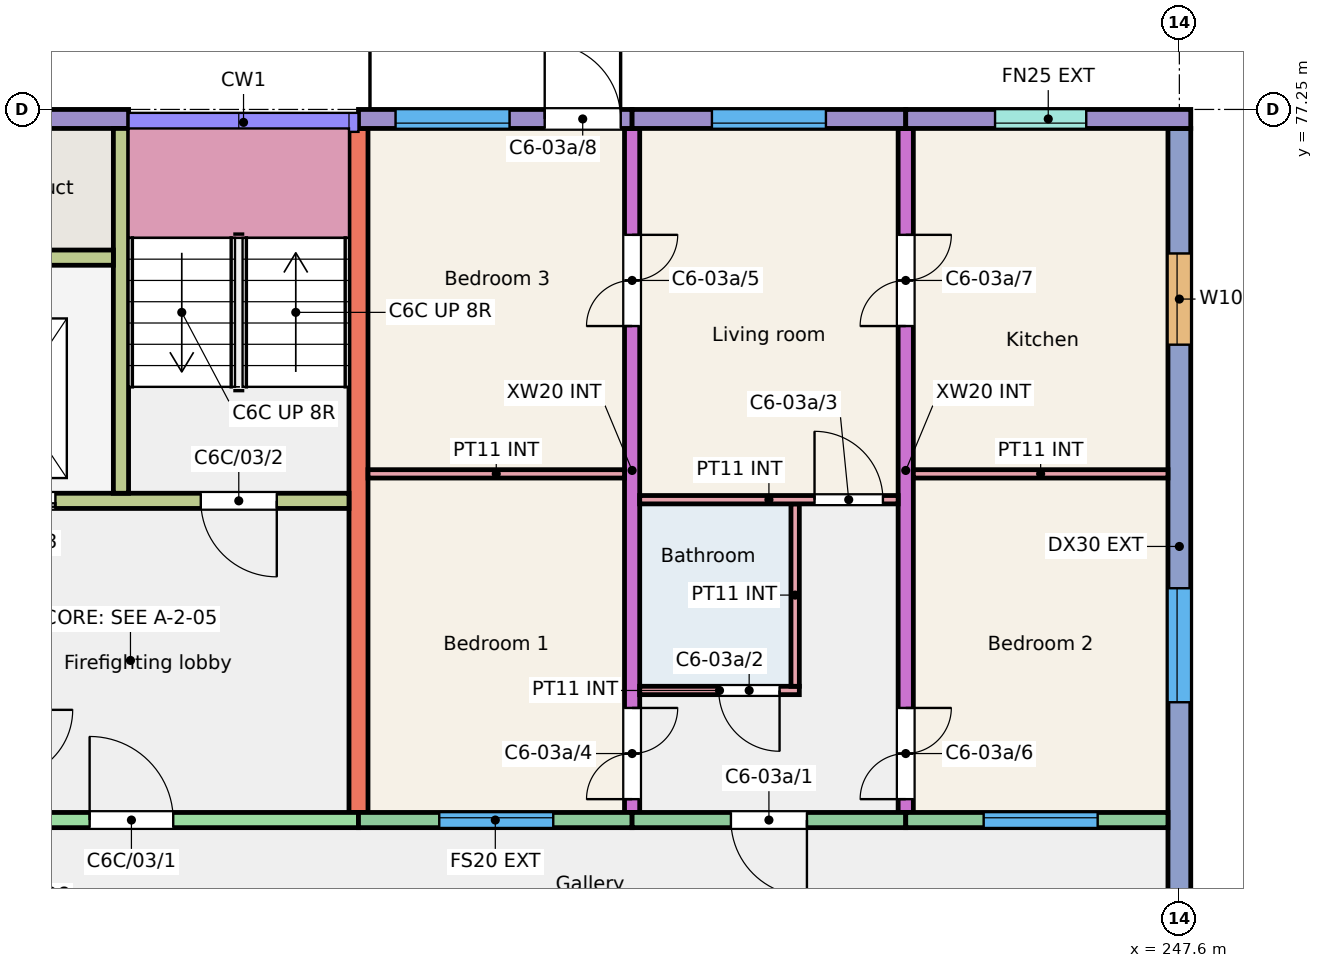
"""IFC4 building model, lengths in metres.
Left out: names, types, materials, properties, quantities, classifications, styles, units other than length and angle.
Written with IfcOpenShell. Run it as: python <this file> out.ifc"""

import sys

from ifc_helpers import new_model, si_unit, direction, frame, frame_2d, origin, place, context, subcontext, project, spatial, rectangle, extrude, element, fill, save


model = new_model("IFC4")
c1 = context("Model", 3, precision=1e-05, world=origin(), true_north=direction((0.0, 1.0)))
c2 = subcontext(c1, "Body", "Model", "MODEL_VIEW")
j1 = project(units=[si_unit("LENGTHUNIT", "METRE"), si_unit("PLANEANGLEUNIT", "RADIAN")], contexts=[c1])
p1 = place(None, origin())
s1 = spatial("IfcSite", under=j1, at=p1, CompositionType="ELEMENT")
p2 = place(p1, origin())
s2 = spatial("IfcBuilding", under=s1, at=p2, CompositionType="ELEMENT")
p3 = place(p2, frame((0.0, 0.0, 9.0)))
s3 = spatial("IfcBuildingStorey", under=s2, at=p3, CompositionType="ELEMENT", Elevation=9.0)
p4 = place(p3, frame((236.8, 68.0, 0.0), z_axis=(0.0, 0.0, 1.0), x_axis=(0.0, 1.0, 0.0)))
e1 = element("IfcWall", 1, at=p4, inside=s3, PredefinedType="SHEAR", context=c2, shape_type="SweptSolid", body=[
    extrude(rectangle(XDim=9.0, YDim=0.25, at=frame_2d((4.5, 0.0))), origin(), (0.0, 0.0, 1.0), 3.0),
])
p5 = place(p3, frame((240.4, 68.0, 0.0), z_axis=(0.0, 0.0, 1.0), x_axis=(0.0, 1.0, 0.0)))
e2 = element("IfcWall", 2, at=p5, inside=s3, PredefinedType="SHEAR", context=c2, shape_type="SweptSolid", body=[
    extrude(rectangle(XDim=9.0, YDim=0.2, at=frame_2d((4.5, 0.0))), origin(), (0.0, 0.0, 1.0), 3.0),
])
p6 = place(p5, frame((0.175, 0.0, 0.0)))
e3 = element("IfcOpeningElement", 3, at=p6, cuts=e2, PredefinedType="OPENING", context=c2, shape_type="SweptSolid", body=[
    extrude(rectangle(XDim=1.2, YDim=2.1, at=frame_2d((0.6, 1.05))), frame((0.0, 0.11, 0.0), z_axis=(0.0, -1.0, 0.0), x_axis=(1.0, 0.0, 0.0)), (0.0, 0.0, 1.0), 0.22),
])
p7 = place(p5, frame((6.4, 0.0, 0.0)))
e4 = element("IfcOpeningElement", 4, at=p7, cuts=e2, PredefinedType="OPENING", context=c2, shape_type="SweptSolid", body=[
    extrude(rectangle(XDim=1.2, YDim=2.1, at=frame_2d((0.6, 1.05))), frame((0.0, 0.11, 0.0), z_axis=(0.0, -1.0, 0.0), x_axis=(1.0, 0.0, 0.0)), (0.0, 0.0, 1.0), 0.22),
])
p8 = place(p3, frame((244.0, 68.0, 0.0), z_axis=(0.0, 0.0, 1.0), x_axis=(0.0, 1.0, 0.0)))
e5 = element("IfcWall", 5, at=p8, inside=s3, PredefinedType="SHEAR", context=c2, shape_type="SweptSolid", body=[
    extrude(rectangle(XDim=9.0, YDim=0.2, at=frame_2d((4.5, 0.0))), origin(), (0.0, 0.0, 1.0), 3.0),
])
p9 = place(p8, frame((0.175, 0.0, 0.0)))
e6 = element("IfcOpeningElement", 6, at=p9, cuts=e5, PredefinedType="OPENING", context=c2, shape_type="SweptSolid", body=[
    extrude(rectangle(XDim=1.2, YDim=2.1, at=frame_2d((0.6, 1.05))), frame((0.0, 0.11, 0.0), z_axis=(0.0, -1.0, 0.0), x_axis=(1.0, 0.0, 0.0)), (0.0, 0.0, 1.0), 0.22),
])
p10 = place(p8, frame((6.4, 0.0, 0.0)))
e7 = element("IfcOpeningElement", 7, at=p10, cuts=e5, PredefinedType="OPENING", context=c2, shape_type="SweptSolid", body=[
    extrude(rectangle(XDim=1.2, YDim=2.1, at=frame_2d((0.6, 1.05))), frame((0.0, 0.11, 0.0), z_axis=(0.0, -1.0, 0.0), x_axis=(1.0, 0.0, 0.0)), (0.0, 0.0, 1.0), 0.22),
])
p11 = place(p3, frame((247.6, 66.0, 0.0), z_axis=(0.0, 0.0, 1.0), x_axis=(0.0, 1.0, 0.0)))
e8 = element("IfcWall", 8, at=p11, inside=s3, PredefinedType="SHEAR", context=c2, shape_type="SweptSolid", body=[
    extrude(rectangle(XDim=11.0, YDim=0.3, at=frame_2d((5.5, 0.0))), origin(), (0.0, 0.0, 1.0), 3.0),
])
p12 = place(p11, frame((3.45, 0.0, 0.9)))
e9 = element("IfcOpeningElement", 9, at=p12, cuts=e8, PredefinedType="OPENING", context=c2, shape_type="SweptSolid", body=[
    extrude(rectangle(XDim=1.5, YDim=1.5, at=frame_2d((0.75, 0.75))), frame((0.0, 0.16, 0.0), z_axis=(0.0, -1.0, 0.0), x_axis=(1.0, 0.0, 0.0)), (0.0, 0.0, 1.0), 0.32),
])
p13 = place(p11, frame((8.155, 0.0, 0.9)))
e10 = element("IfcOpeningElement", 10, at=p13, cuts=e8, PredefinedType="OPENING", context=c2, shape_type="SweptSolid", body=[
    extrude(rectangle(XDim=1.2, YDim=1.5, at=frame_2d((0.6, 0.75))), frame((0.0, 0.16, 0.0), z_axis=(0.0, -1.0, 0.0), x_axis=(1.0, 0.0, 0.0)), (0.0, 0.0, 1.0), 0.32),
])
p14 = place(p3, frame((230.8, 77.125, 0.0), z_axis=(0.0, 0.0, 1.0), x_axis=(1.0, 0.0, 0.0)))
e11 = element("IfcWall", 11, at=p14, inside=s3, PredefinedType="SOLIDWALL", context=c2, shape_type="SweptSolid", body=[
    extrude(rectangle(XDim=2.975, YDim=0.25, at=frame_2d((1.487, 0.0))), origin(), (0.0, 0.0, 1.0), 3.0),
])
p15 = place(p3, frame((230.95, 67.9, 0.0), z_axis=(0.0, 0.0, 1.0), x_axis=(1.0, 0.0, 0.0)))
e12 = element("IfcWall", 12, at=p15, inside=s3, PredefinedType="SHEAR", context=c2, shape_type="SweptSolid", body=[
    extrude(rectangle(XDim=5.85, YDim=0.2, at=frame_2d((2.925, 0.0))), origin(), (0.0, 0.0, 1.0), 3.0),
])
p16 = place(p15, frame((2.312, 0.0, 0.0)))
e13 = element("IfcOpeningElement", 13, at=p16, cuts=e12, PredefinedType="OPENING", context=c2, shape_type="SweptSolid", body=[
    extrude(rectangle(XDim=1.1, YDim=2.1, at=frame_2d((0.55, 1.05))), frame((0.0, 0.11, 0.0), z_axis=(0.0, -1.0, 0.0), x_axis=(1.0, 0.0, 0.0)), (0.0, 0.0, 1.0), 0.22),
])
p17 = place(p3, frame((230.95, 72.1, 0.0), z_axis=(0.0, 0.0, 1.0), x_axis=(1.0, 0.0, 0.0)))
e14 = element("IfcWall", 14, at=p17, inside=s3, PredefinedType="SHEAR", context=c2, shape_type="SweptSolid", body=[
    extrude(rectangle(XDim=5.725, YDim=0.2, at=frame_2d((2.863, 0.0))), origin(), (0.0, 0.0, 1.0), 3.0),
])
p18 = place(p17, frame((3.775, 0.0, 0.0)))
e15 = element("IfcOpeningElement", 15, at=p18, cuts=e14, PredefinedType="OPENING", context=c2, shape_type="SweptSolid", body=[
    extrude(rectangle(XDim=1.0, YDim=2.1, at=frame_2d((0.5, 1.05))), frame((0.0, 0.11, 0.0), z_axis=(0.0, -1.0, 0.0), x_axis=(1.0, 0.0, 0.0)), (0.0, 0.0, 1.0), 0.22),
])
p19 = place(p17, frame((0.762, 0.0, 0.0)))
e16 = element("IfcOpeningElement", 16, at=p19, cuts=e14, PredefinedType="OPENING", context=c2, shape_type="SweptSolid", body=[
    extrude(rectangle(XDim=1.1, YDim=2.1, at=frame_2d((0.55, 1.05))), frame((0.0, 0.11, 0.0), z_axis=(0.0, -1.0, 0.0), x_axis=(1.0, 0.0, 0.0)), (0.0, 0.0, 1.0), 0.22),
])
p20 = place(p3, frame((233.675, 72.2, 0.0), z_axis=(0.0, 0.0, 1.0), x_axis=(0.0, 1.0, 0.0)))
e17 = element("IfcWall", 17, at=p20, inside=s3, PredefinedType="SHEAR", context=c2, shape_type="SweptSolid", body=[
    extrude(rectangle(XDim=4.8, YDim=0.2, at=frame_2d((2.4, 0.0))), origin(), (0.0, 0.0, 1.0), 3.0),
])
p21 = place(p3, frame((230.95, 75.3, 0.0), z_axis=(0.0, 0.0, 1.0), x_axis=(1.0, 0.0, 0.0)))
e18 = element("IfcWall", 18, at=p21, inside=s3, PredefinedType="SHEAR", context=c2, shape_type="SweptSolid", body=[
    extrude(rectangle(XDim=2.625, YDim=0.2, at=frame_2d((1.312, 0.0))), origin(), (0.0, 0.0, 1.0), 3.0),
])
p22 = place(p3, frame((236.8, 77.125, 0.0), z_axis=(0.0, 0.0, 1.0), x_axis=(1.0, 0.0, 0.0)))
e19 = element("IfcWall", 19, at=p22, inside=s3, PredefinedType="SOLIDWALL", context=c2, shape_type="SweptSolid", body=[
    extrude(rectangle(XDim=3.6, YDim=0.25, at=frame_2d((1.8, 0.0))), origin(), (0.0, 0.0, 1.0), 3.0),
])
p23 = place(p22, frame((0.488, 0.0, 0.9)))
e20 = element("IfcOpeningElement", 20, at=p23, cuts=e19, PredefinedType="OPENING", context=c2, shape_type="SweptSolid", body=[
    extrude(rectangle(XDim=1.5, YDim=1.5, at=frame_2d((0.75, 0.75))), frame((0.0, 0.135, 0.0), z_axis=(0.0, -1.0, 0.0), x_axis=(1.0, 0.0, 0.0)), (0.0, 0.0, 1.0), 0.27),
])
p24 = place(p22, frame((2.45, 0.0, 0.0)))
e21 = element("IfcOpeningElement", 21, at=p24, cuts=e19, PredefinedType="OPENING", context=c2, shape_type="SweptSolid", body=[
    extrude(rectangle(XDim=1.0, YDim=2.1, at=frame_2d((0.5, 1.05))), frame((0.0, 0.135, 0.0), z_axis=(0.0, -1.0, 0.0), x_axis=(1.0, 0.0, 0.0)), (0.0, 0.0, 1.0), 0.27),
])
p25 = place(p3, frame((236.8, 67.9, 0.0), z_axis=(0.0, 0.0, 1.0), x_axis=(1.0, 0.0, 0.0)))
e22 = element("IfcWall", 22, at=p25, inside=s3, PredefinedType="SOLIDWALL", context=c2, shape_type="SweptSolid", body=[
    extrude(rectangle(XDim=3.6, YDim=0.2, at=frame_2d((1.8, 0.0))), origin(), (0.0, 0.0, 1.0), 3.0),
])
p26 = place(p25, frame((1.062, 0.0, 0.9)))
e23 = element("IfcOpeningElement", 23, at=p26, cuts=e22, PredefinedType="OPENING", context=c2, shape_type="SweptSolid", body=[
    extrude(rectangle(XDim=1.5, YDim=1.5, at=frame_2d((0.75, 0.75))), frame((0.0, 0.11, 0.0), z_axis=(0.0, -1.0, 0.0), x_axis=(1.0, 0.0, 0.0)), (0.0, 0.0, 1.0), 0.22),
])
p27 = place(p3, frame((240.4, 77.125, 0.0), z_axis=(0.0, 0.0, 1.0), x_axis=(1.0, 0.0, 0.0)))
e24 = element("IfcWall", 24, at=p27, inside=s3, PredefinedType="SOLIDWALL", context=c2, shape_type="SweptSolid", body=[
    extrude(rectangle(XDim=3.6, YDim=0.25, at=frame_2d((1.8, 0.0))), origin(), (0.0, 0.0, 1.0), 3.0),
])
p28 = place(p27, frame((1.05, 0.0, 0.9)))
e25 = element("IfcOpeningElement", 25, at=p28, cuts=e24, PredefinedType="OPENING", context=c2, shape_type="SweptSolid", body=[
    extrude(rectangle(XDim=1.5, YDim=1.5, at=frame_2d((0.75, 0.75))), frame((0.0, 0.135, 0.0), z_axis=(0.0, -1.0, 0.0), x_axis=(1.0, 0.0, 0.0)), (0.0, 0.0, 1.0), 0.27),
])
p29 = place(p3, frame((240.4, 67.9, 0.0), z_axis=(0.0, 0.0, 1.0), x_axis=(1.0, 0.0, 0.0)))
e26 = element("IfcWall", 26, at=p29, inside=s3, PredefinedType="SOLIDWALL", context=c2, shape_type="SweptSolid", body=[
    extrude(rectangle(XDim=3.6, YDim=0.2, at=frame_2d((1.8, 0.0))), origin(), (0.0, 0.0, 1.0), 3.0),
])
p30 = place(p29, frame((1.3, 0.0, 0.0)))
e27 = element("IfcOpeningElement", 27, at=p30, cuts=e26, PredefinedType="OPENING", context=c2, shape_type="SweptSolid", body=[
    extrude(rectangle(XDim=1.0, YDim=2.1, at=frame_2d((0.5, 1.05))), frame((0.0, 0.11, 0.0), z_axis=(0.0, -1.0, 0.0), x_axis=(1.0, 0.0, 0.0)), (0.0, 0.0, 1.0), 0.22),
])
p31 = place(p3, frame((244.0, 77.125, 0.0), z_axis=(0.0, 0.0, 1.0), x_axis=(1.0, 0.0, 0.0)))
e28 = element("IfcWall", 28, at=p31, inside=s3, PredefinedType="SOLIDWALL", context=c2, shape_type="SweptSolid", body=[
    extrude(rectangle(XDim=3.75, YDim=0.25, at=frame_2d((1.875, 0.0))), origin(), (0.0, 0.0, 1.0), 3.0),
])
p32 = place(p31, frame((1.175, 0.0, 1.1)))
e29 = element("IfcOpeningElement", 29, at=p32, cuts=e28, PredefinedType="OPENING", context=c2, shape_type="SweptSolid", body=[
    extrude(rectangle(XDim=1.2, YDim=1.3, at=frame_2d((0.6, 0.65))), frame((0.0, 0.135, 0.0), z_axis=(0.0, -1.0, 0.0), x_axis=(1.0, 0.0, 0.0)), (0.0, 0.0, 1.0), 0.27),
])
p33 = place(p3, frame((244.0, 67.9, 0.0), z_axis=(0.0, 0.0, 1.0), x_axis=(1.0, 0.0, 0.0)))
e30 = element("IfcWall", 30, at=p33, inside=s3, PredefinedType="SOLIDWALL", context=c2, shape_type="SweptSolid", body=[
    extrude(rectangle(XDim=3.45, YDim=0.2, at=frame_2d((1.725, 0.0))), origin(), (0.0, 0.0, 1.0), 3.0),
])
p34 = place(p33, frame((1.025, 0.0, 0.9)))
e31 = element("IfcOpeningElement", 31, at=p34, cuts=e30, PredefinedType="OPENING", context=c2, shape_type="SweptSolid", body=[
    extrude(rectangle(XDim=1.5, YDim=1.5, at=frame_2d((0.75, 0.75))), frame((0.0, 0.11, 0.0), z_axis=(0.0, -1.0, 0.0), x_axis=(1.0, 0.0, 0.0)), (0.0, 0.0, 1.0), 0.22),
])
p35 = place(p3, frame((240.5, 69.605, 0.0), z_axis=(0.0, 0.0, 1.0), x_axis=(1.0, 0.0, 0.0)))
e32 = element("IfcWall", 32, at=p35, inside=s3, PredefinedType="PARTITIONING", context=c2, shape_type="SweptSolid", body=[
    extrude(rectangle(XDim=2.1, YDim=0.11, at=frame_2d((1.05, 0.0))), origin(), (0.0, 0.0, 1.0), 2.8),
])
p36 = place(p35, frame((1.04, 0.0, 0.0)))
e33 = element("IfcOpeningElement", 33, at=p36, cuts=e32, PredefinedType="OPENING", context=c2, shape_type="SweptSolid", body=[
    extrude(rectangle(XDim=0.8, YDim=2.1, at=frame_2d((0.4, 1.05))), frame((0.0, 0.065, 0.0), z_axis=(0.0, -1.0, 0.0), x_axis=(1.0, 0.0, 0.0)), (0.0, 0.0, 1.0), 0.13),
])
p37 = place(p3, frame((242.545, 69.66, 0.0), z_axis=(0.0, 0.0, 1.0), x_axis=(0.0, 1.0, 0.0)))
e34 = element("IfcWall", 34, at=p37, inside=s3, PredefinedType="PARTITIONING", context=c2, shape_type="SweptSolid", body=[
    extrude(rectangle(XDim=2.4, YDim=0.11, at=frame_2d((1.2, 0.0))), origin(), (0.0, 0.0, 1.0), 2.8),
])
p38 = place(p3, frame((240.5, 72.115, 0.0), z_axis=(0.0, 0.0, 1.0), x_axis=(1.0, 0.0, 0.0)))
e35 = element("IfcWall", 35, at=p38, inside=s3, PredefinedType="PARTITIONING", context=c2, shape_type="SweptSolid", body=[
    extrude(rectangle(XDim=3.4, YDim=0.11, at=frame_2d((1.7, 0.0))), origin(), (0.0, 0.0, 1.0), 2.8),
])
p39 = place(p38, frame((2.3, 0.0, 0.0)))
e36 = element("IfcOpeningElement", 36, at=p39, cuts=e35, PredefinedType="OPENING", context=c2, shape_type="SweptSolid", body=[
    extrude(rectangle(XDim=0.9, YDim=2.1, at=frame_2d((0.45, 1.05))), frame((0.0, 0.065, 0.0), z_axis=(0.0, -1.0, 0.0), x_axis=(1.0, 0.0, 0.0)), (0.0, 0.0, 1.0), 0.13),
])
p40 = place(p3, frame((236.925, 72.455, 0.0), z_axis=(0.0, 0.0, 1.0), x_axis=(1.0, 0.0, 0.0)))
e37 = element("IfcWall", 37, at=p40, inside=s3, PredefinedType="PARTITIONING", context=c2, shape_type="SweptSolid", body=[
    extrude(rectangle(XDim=3.375, YDim=0.11, at=frame_2d((1.688, 0.0))), origin(), (0.0, 0.0, 1.0), 2.8),
])
p41 = place(p3, frame((244.1, 72.455, 0.0), z_axis=(0.0, 0.0, 1.0), x_axis=(1.0, 0.0, 0.0)))
e38 = element("IfcWall", 38, at=p41, inside=s3, PredefinedType="PARTITIONING", context=c2, shape_type="SweptSolid", body=[
    extrude(rectangle(XDim=3.35, YDim=0.11, at=frame_2d((1.675, 0.0))), origin(), (0.0, 0.0, 1.0), 2.8),
])
p42 = place(p26, origin())
e39 = element("IfcWindow", 39, at=p42, inside=s3, PartitioningType="SINGLE_PANEL", PredefinedType="WINDOW", context=c2, shape_type="SweptSolid", body=[
    extrude(rectangle(XDim=1.5, YDim=1.5, at=frame_2d((0.75, 0.75))), frame((0.0, 0.06, 0.0), z_axis=(0.0, -1.0, 0.0), x_axis=(1.0, 0.0, 0.0)), (0.0, 0.0, 1.0), 0.06),
])
fill(e23, e39)
p43 = place(p23, origin())
e40 = element("IfcWindow", 40, at=p43, inside=s3, PartitioningType="SINGLE_PANEL", PredefinedType="WINDOW", context=c2, shape_type="SweptSolid", body=[
    extrude(rectangle(XDim=1.5, YDim=1.5, at=frame_2d((0.75, 0.75))), frame((0.0, -0.025, 0.0), z_axis=(0.0, -1.0, 0.0), x_axis=(1.0, 0.0, 0.0)), (0.0, 0.0, 1.0), 0.06),
])
fill(e20, e40)
p44 = place(p34, origin())
e41 = element("IfcWindow", 41, at=p44, inside=s3, PartitioningType="SINGLE_PANEL", PredefinedType="WINDOW", context=c2, shape_type="SweptSolid", body=[
    extrude(rectangle(XDim=1.5, YDim=1.5, at=frame_2d((0.75, 0.75))), frame((0.0, 0.06, 0.0), z_axis=(0.0, -1.0, 0.0), x_axis=(1.0, 0.0, 0.0)), (0.0, 0.0, 1.0), 0.06),
])
fill(e31, e41)
p45 = place(p32, origin())
e42 = element("IfcWindow", 42, at=p45, inside=s3, PartitioningType="SINGLE_PANEL", PredefinedType="WINDOW", context=c2, shape_type="SweptSolid", body=[
    extrude(rectangle(XDim=1.2, YDim=1.3, at=frame_2d((0.6, 0.65))), frame((0.0, -0.025, 0.0), z_axis=(0.0, -1.0, 0.0), x_axis=(1.0, 0.0, 0.0)), (0.0, 0.0, 1.0), 0.06),
])
fill(e29, e42)
p46 = place(p28, origin())
e43 = element("IfcWindow", 43, at=p46, inside=s3, PartitioningType="SINGLE_PANEL", PredefinedType="WINDOW", context=c2, shape_type="SweptSolid", body=[
    extrude(rectangle(XDim=1.5, YDim=1.5, at=frame_2d((0.75, 0.75))), frame((0.0, -0.025, 0.0), z_axis=(0.0, -1.0, 0.0), x_axis=(1.0, 0.0, 0.0)), (0.0, 0.0, 1.0), 0.06),
])
fill(e25, e43)
p47 = place(p12, origin())
e44 = element("IfcWindow", 44, at=p47, inside=s3, PartitioningType="SINGLE_PANEL", PredefinedType="WINDOW", context=c2, shape_type="SweptSolid", body=[
    extrude(rectangle(XDim=1.5, YDim=1.5, at=frame_2d((0.75, 0.75))), frame((0.0, 0.06, 0.0), z_axis=(0.0, -1.0, 0.0), x_axis=(1.0, 0.0, 0.0)), (0.0, 0.0, 1.0), 0.06),
])
fill(e9, e44)
p48 = place(p13, origin())
e45 = element("IfcWindow", 45, at=p48, inside=s3, PartitioningType="SINGLE_PANEL", PredefinedType="WINDOW", context=c2, shape_type="SweptSolid", body=[
    extrude(rectangle(XDim=1.2, YDim=1.5, at=frame_2d((0.6, 0.75))), frame((0.0, 0.06, 0.0), z_axis=(0.0, -1.0, 0.0), x_axis=(1.0, 0.0, 0.0)), (0.0, 0.0, 1.0), 0.06),
])
fill(e10, e45)
p49 = place(p30, origin())
e46 = element("IfcDoor", 46, at=p49, inside=s3, OperationType="SINGLE_SWING_RIGHT", PredefinedType="DOOR", context=c2, shape_type="SweptSolid", body=[
    extrude(rectangle(XDim=1.0, YDim=2.1, at=frame_2d((0.5, 1.05))), frame((0.0, 0.025, 0.0), z_axis=(0.0, -1.0, 0.0), x_axis=(1.0, 0.0, 0.0)), (0.0, 0.0, 1.0), 0.05),
])
fill(e27, e46)
p50 = place(p36, origin())
e47 = element("IfcDoor", 47, at=p50, inside=s3, OperationType="SINGLE_SWING_RIGHT", PredefinedType="DOOR", context=c2, shape_type="SweptSolid", body=[
    extrude(rectangle(XDim=0.8, YDim=2.1, at=frame_2d((0.4, 1.05))), frame((0.0, 0.025, 0.0), z_axis=(0.0, -1.0, 0.0), x_axis=(1.0, 0.0, 0.0)), (0.0, 0.0, 1.0), 0.05),
])
fill(e33, e47)
p51 = place(p39, origin())
e48 = element("IfcDoor", 48, at=p51, inside=s3, OperationType="SINGLE_SWING_LEFT", PredefinedType="DOOR", context=c2, shape_type="SweptSolid", body=[
    extrude(rectangle(XDim=0.9, YDim=2.1, at=frame_2d((0.45, 1.05))), frame((0.0, 0.025, 0.0), z_axis=(0.0, -1.0, 0.0), x_axis=(1.0, 0.0, 0.0)), (0.0, 0.0, 1.0), 0.05),
])
fill(e36, e48)
p52 = place(p6, origin())
e49 = element("IfcDoor", 49, at=p52, inside=s3, OperationType="DOUBLE_DOOR_SINGLE_SWING", PredefinedType="DOOR", context=c2, shape_type="SweptSolid", body=[
    extrude(rectangle(XDim=1.2, YDim=2.1, at=frame_2d((0.6, 1.05))), frame((0.0, 0.025, 0.0), z_axis=(0.0, -1.0, 0.0), x_axis=(1.0, 0.0, 0.0)), (0.0, 0.0, 1.0), 0.05),
])
fill(e3, e49)
p53 = place(p7, origin())
e50 = element("IfcDoor", 50, at=p53, inside=s3, OperationType="DOUBLE_DOOR_SINGLE_SWING", PredefinedType="DOOR", context=c2, shape_type="SweptSolid", body=[
    extrude(rectangle(XDim=1.2, YDim=2.1, at=frame_2d((0.6, 1.05))), frame((0.0, 0.025, 0.0), z_axis=(0.0, -1.0, 0.0), x_axis=(1.0, 0.0, 0.0)), (0.0, 0.0, 1.0), 0.05),
])
fill(e4, e50)
p54 = place(p9, origin())
e51 = element("IfcDoor", 51, at=p54, inside=s3, OperationType="DOUBLE_DOOR_SINGLE_SWING", PredefinedType="DOOR", context=c2, shape_type="SweptSolid", body=[
    extrude(rectangle(XDim=1.2, YDim=2.1, at=frame_2d((0.6, 1.05))), frame((0.0, 0.025, 0.0), z_axis=(0.0, -1.0, 0.0), x_axis=(1.0, 0.0, 0.0)), (0.0, 0.0, 1.0), 0.05),
])
fill(e6, e51)
p55 = place(p10, origin())
e52 = element("IfcDoor", 52, at=p55, inside=s3, OperationType="DOUBLE_DOOR_SINGLE_SWING", PredefinedType="DOOR", context=c2, shape_type="SweptSolid", body=[
    extrude(rectangle(XDim=1.2, YDim=2.1, at=frame_2d((0.6, 1.05))), frame((0.0, 0.025, 0.0), z_axis=(0.0, -1.0, 0.0), x_axis=(1.0, 0.0, 0.0)), (0.0, 0.0, 1.0), 0.05),
])
fill(e7, e52)
p56 = place(p24, origin())
e53 = element("IfcDoor", 53, at=p56, inside=s3, OperationType="SINGLE_SWING_LEFT", PredefinedType="DOOR", context=c2, shape_type="SweptSolid", body=[
    extrude(rectangle(XDim=1.0, YDim=2.1, at=frame_2d((0.5, 1.05))), frame((0.0, 0.025, 0.0), z_axis=(0.0, -1.0, 0.0), x_axis=(1.0, 0.0, 0.0)), (0.0, 0.0, 1.0), 0.05),
])
fill(e21, e53)
p57 = place(p16, origin())
e54 = element("IfcDoor", 54, at=p57, inside=s3, OperationType="SINGLE_SWING_LEFT", PredefinedType="DOOR", context=c2, shape_type="SweptSolid", body=[
    extrude(rectangle(XDim=1.1, YDim=2.1, at=frame_2d((0.55, 1.05))), frame((0.0, 0.025, 0.0), z_axis=(0.0, -1.0, 0.0), x_axis=(1.0, 0.0, 0.0)), (0.0, 0.0, 1.0), 0.05),
])
fill(e13, e54)
p58 = place(p18, origin())
e55 = element("IfcDoor", 55, at=p58, inside=s3, OperationType="SINGLE_SWING_RIGHT", PredefinedType="DOOR", context=c2, shape_type="SweptSolid", body=[
    extrude(rectangle(XDim=1.0, YDim=2.1, at=frame_2d((0.5, 1.05))), frame((0.0, 0.025, 0.0), z_axis=(0.0, -1.0, 0.0), x_axis=(1.0, 0.0, 0.0)), (0.0, 0.0, 1.0), 0.05),
])
fill(e15, e55)
p59 = place(p19, origin())
e56 = element("IfcDoor", 56, at=p59, inside=s3, OperationType="DOUBLE_DOOR_SLIDING", PredefinedType="DOOR", context=c2, shape_type="SweptSolid", body=[
    extrude(rectangle(XDim=1.1, YDim=2.1, at=frame_2d((0.55, 1.05))), frame((0.0, 0.025, 0.0), z_axis=(0.0, -1.0, 0.0), x_axis=(1.0, 0.0, 0.0)), (0.0, 0.0, 1.0), 0.05),
])
fill(e16, e56)
save(model, sys.argv[1])
